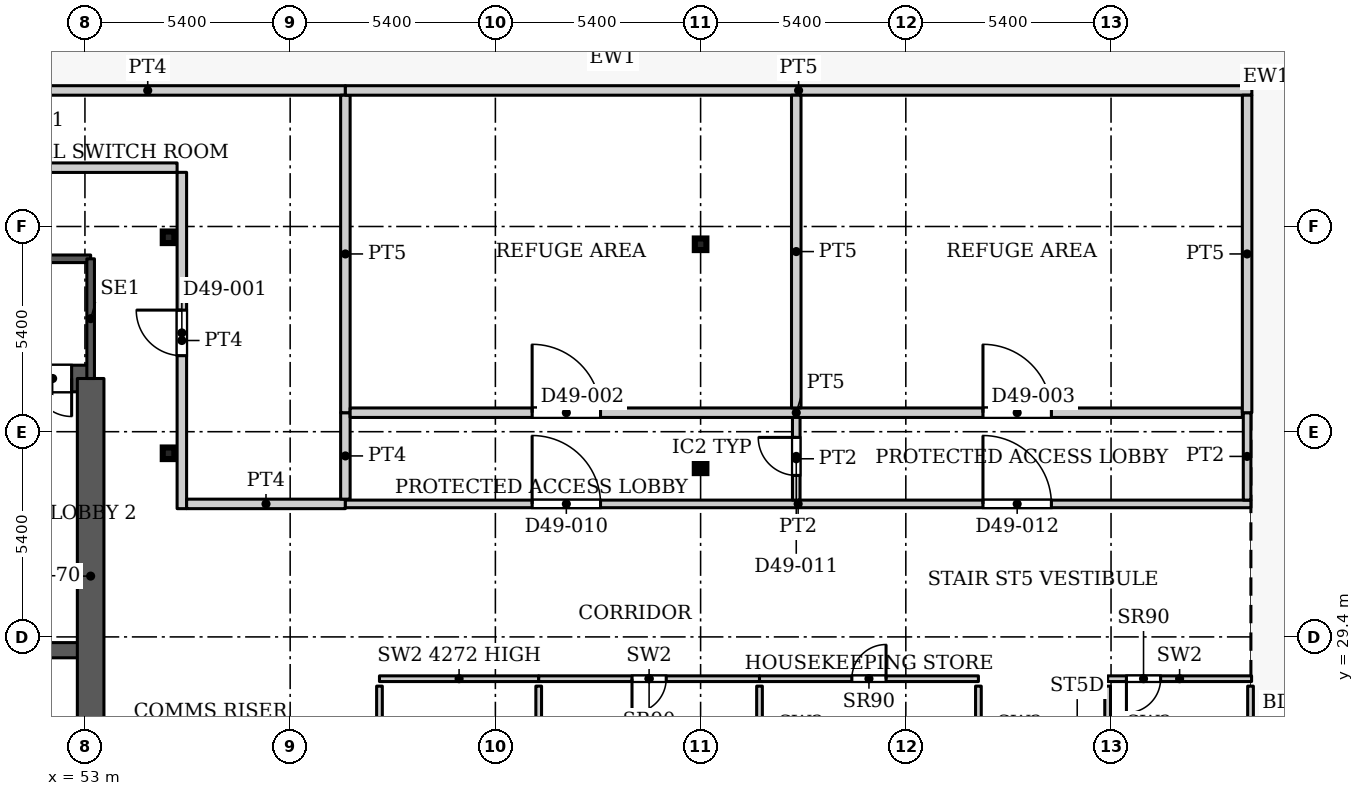
"""IFC4 building model, lengths in metres.
Left out: names, types, materials, properties, quantities, classifications, styles, units other than length and angle.
Written with IfcOpenShell. Run it as: python <this file> out.ifc"""

import sys

from ifc_helpers import new_model, si_unit, direction, frame, frame_2d, origin, origin_2d, place, context, subcontext, project, spatial, rectangle, hollow_rectangle, extrude, source, transform, mapped, element, fill, save


model = new_model("IFC4")
c1 = context("Model", 3, precision=1e-05, world=origin(), true_north=direction((0.0, 1.0)))
c2 = subcontext(c1, "Body", "Model", "MODEL_VIEW")
j1 = project(units=[si_unit("LENGTHUNIT", "METRE"), si_unit("PLANEANGLEUNIT", "RADIAN")], contexts=[c1])
p1 = place(None, origin())
s1 = spatial("IfcSite", under=j1, at=p1, CompositionType="ELEMENT")
p2 = place(p1, origin())
s2 = spatial("IfcBuilding", under=s1, at=p2, CompositionType="ELEMENT")
p3 = place(p2, frame((0.0, 0.0, 211.1)))
s3 = spatial("IfcBuildingStorey", under=s2, at=p3, CompositionType="ELEMENT", Elevation=211.1)
for number, where, z_axis, x_axis in (
    (1, (69.2, 33.863, 0.0), (0.0, 0.0, 1.0), (1.0, 0.0, 0.0)),
    (2, (55.2, 34.232, 0.0), (0.0, 0.0, 1.0), (1.0, 0.0, 0.0)),
    (3, (69.2, 39.732, 0.0), (0.0, 0.0, 1.0), (1.0, 0.0, 0.0)),
    (4, (55.2, 39.916, 0.0), (0.0, 0.0, 1.0), (1.0, 0.0, 0.0)),
):
    element("IfcColumn", number, at=place(p3, frame(where, z_axis=z_axis, x_axis=x_axis)), inside=s3, PredefinedType="COLUMN", context=c2, shape_type="SweptSolid", body=[
        extrude(hollow_rectangle(XDim=0.305, YDim=0.305, WallThickness=0.016, InnerFilletRadius=0.016, OuterFilletRadius=0.032, at=origin_2d()), origin(), (0.0, 0.0, 1.0), 5.1),
    ])
p4 = place(p3, frame((34.75, 29.05, 0.0), z_axis=(0.0, 0.0, 1.0), x_axis=(1.0, 0.0, 0.0)))
e5 = element("IfcWall", 5, at=p4, inside=s3, PredefinedType="SHEAR", context=c2, shape_type="SweptSolid", body=[
    extrude(rectangle(XDim=18.4, YDim=0.4, at=frame_2d((9.2, 0.0))), origin(), (0.0, 0.0, 1.0), 5.1),
])
p5 = place(p4, frame((0.875, 0.0, 0.0)))
e6 = element("IfcOpeningElement", 6, at=p5, cuts=e5, PredefinedType="OPENING", context=c2, shape_type="SweptSolid", body=[
    extrude(rectangle(XDim=1.1, YDim=2.2, at=frame_2d((0.55, 1.1))), frame((0.0, 0.21, 0.0), z_axis=(0.0, -1.0, 0.0), x_axis=(1.0, 0.0, 0.0)), (0.0, 0.0, 1.0), 0.42),
])
p6 = place(p4, frame((3.725, 0.0, 0.0)))
e7 = element("IfcOpeningElement", 7, at=p6, cuts=e5, PredefinedType="OPENING", context=c2, shape_type="SweptSolid", body=[
    extrude(rectangle(XDim=1.1, YDim=2.2, at=frame_2d((0.55, 1.1))), frame((0.0, 0.21, 0.0), z_axis=(0.0, -1.0, 0.0), x_axis=(1.0, 0.0, 0.0)), (0.0, 0.0, 1.0), 0.42),
])
p7 = place(p4, frame((6.575, 0.0, 0.0)))
e8 = element("IfcOpeningElement", 8, at=p7, cuts=e5, PredefinedType="OPENING", context=c2, shape_type="SweptSolid", body=[
    extrude(rectangle(XDim=1.1, YDim=2.2, at=frame_2d((0.55, 1.1))), frame((0.0, 0.21, 0.0), z_axis=(0.0, -1.0, 0.0), x_axis=(1.0, 0.0, 0.0)), (0.0, 0.0, 1.0), 0.42),
])
p8 = place(p4, frame((9.425, 0.0, 0.0)))
e9 = element("IfcOpeningElement", 9, at=p8, cuts=e5, PredefinedType="OPENING", context=c2, shape_type="SweptSolid", body=[
    extrude(rectangle(XDim=1.1, YDim=2.2, at=frame_2d((0.55, 1.1))), frame((0.0, 0.21, 0.0), z_axis=(0.0, -1.0, 0.0), x_axis=(1.0, 0.0, 0.0)), (0.0, 0.0, 1.0), 0.42),
])
p9 = place(p4, frame((12.275, 0.0, 0.0)))
e10 = element("IfcOpeningElement", 10, at=p9, cuts=e5, PredefinedType="OPENING", context=c2, shape_type="SweptSolid", body=[
    extrude(rectangle(XDim=1.1, YDim=2.2, at=frame_2d((0.55, 1.1))), frame((0.0, 0.21, 0.0), z_axis=(0.0, -1.0, 0.0), x_axis=(1.0, 0.0, 0.0)), (0.0, 0.0, 1.0), 0.42),
])
p10 = place(p4, frame((15.125, 0.0, 0.0)))
e11 = element("IfcOpeningElement", 11, at=p10, cuts=e5, PredefinedType="OPENING", context=c2, shape_type="SweptSolid", body=[
    extrude(rectangle(XDim=1.1, YDim=2.2, at=frame_2d((0.55, 1.1))), frame((0.0, 0.21, 0.0), z_axis=(0.0, -1.0, 0.0), x_axis=(1.0, 0.0, 0.0)), (0.0, 0.0, 1.0), 0.42),
])
p11 = place(p3, frame((34.75, 36.2, 0.0), z_axis=(0.0, 0.0, 1.0), x_axis=(1.0, 0.0, 0.0)))
e12 = element("IfcWall", 12, at=p11, inside=s3, PredefinedType="SHEAR", context=c2, shape_type="SweptSolid", body=[
    extrude(rectangle(XDim=18.4, YDim=0.7, at=frame_2d((9.2, 0.0))), origin(), (0.0, 0.0, 1.0), 5.1),
])
p12 = place(p11, frame((16.9, 0.0, 0.0)))
e13 = element("IfcOpeningElement", 13, at=p12, cuts=e12, PredefinedType="OPENING", context=c2, shape_type="SweptSolid", body=[
    extrude(rectangle(XDim=1.0, YDim=2.2, at=frame_2d((0.5, 1.1))), frame((0.0, 0.36, 0.0), z_axis=(0.0, -1.0, 0.0), x_axis=(1.0, 0.0, 0.0)), (0.0, 0.0, 1.0), 0.72),
])
p13 = place(p3, frame((53.15, 25.8, 0.0), z_axis=(0.0, 0.0, 1.0), x_axis=(0.0, 1.0, 0.0)))
e14 = element("IfcWall", 14, at=p13, inside=s3, PredefinedType="SHEAR", context=c2, shape_type="SweptSolid", body=[
    extrude(rectangle(XDim=10.4, YDim=0.7, at=frame_2d((5.2, 0.0))), origin(), (0.0, 0.0, 1.0), 5.1),
])
p14 = place(p3, frame((43.99, 39.35, 0.0), z_axis=(0.0, 0.0, 1.0), x_axis=(1.0, 0.0, 0.0)))
e15 = element("IfcWall", 15, at=p14, inside=s3, PredefinedType="SHEAR", context=c2, shape_type="SweptSolid", body=[
    extrude(rectangle(XDim=9.16, YDim=0.2, at=frame_2d((4.58, 0.0))), origin(), (0.0, 0.0, 1.0), 5.1),
])
p15 = place(p3, frame((53.15, 36.2, 0.0), z_axis=(0.0, 0.0, 1.0), x_axis=(0.0, 1.0, 0.0)))
e16 = element("IfcWall", 16, at=p15, inside=s3, PredefinedType="SHEAR", context=c2, shape_type="SweptSolid", body=[
    extrude(rectangle(XDim=3.15, YDim=0.2, at=frame_2d((1.575, 0.0))), origin(), (0.0, 0.0, 1.0), 5.1),
])
p16 = place(p3, frame((60.75, 28.3, 0.0), z_axis=(0.0, 0.0, 1.0), x_axis=(1.0, 0.0, 0.0)))
e17 = element("IfcWall", 17, at=p16, inside=s3, PredefinedType="PARTITIONING", context=c2, shape_type="SweptSolid", body=[
    extrude(rectangle(XDim=4.19, YDim=0.15, at=frame_2d((2.095, 0.0))), origin(), (0.0, 0.0, 1.0), 4.272),
])
p17 = place(p3, frame((60.75, 23.075, 0.0), z_axis=(0.0, 0.0, 1.0), x_axis=(0.0, 1.0, 0.0)))
e18 = element("IfcWall", 18, at=p17, inside=s3, PredefinedType="PARTITIONING", context=c2, shape_type="SweptSolid", body=[
    extrude(rectangle(XDim=5.03, YDim=0.15, at=frame_2d((2.515, 0.0))), origin(), (0.0, 0.0, 1.0), 5.1),
])
p18 = place(p17, frame((2.387, 0.0, 0.0)))
e19 = element("IfcOpeningElement", 19, at=p18, cuts=e18, PredefinedType="OPENING", context=c2, shape_type="SweptSolid", body=[
    extrude(rectangle(XDim=0.9, YDim=2.2, at=frame_2d((0.45, 1.1))), frame((0.0, 0.085, 0.0), z_axis=(0.0, -1.0, 0.0), x_axis=(1.0, 0.0, 0.0)), (0.0, 0.0, 1.0), 0.17),
])
p19 = place(p3, frame((64.94, 22.854, 0.0), z_axis=(0.0, 0.0, 1.0), x_axis=(0.0, 1.0, 0.0)))
e20 = element("IfcWall", 20, at=p19, inside=s3, PredefinedType="PARTITIONING", context=c2, shape_type="SweptSolid", body=[
    extrude(rectangle(XDim=5.251, YDim=0.15, at=frame_2d((2.625, 0.0))), origin(), (0.0, 0.0, 1.0), 5.1),
])
p20 = place(p3, frame((64.94, 28.3, 0.0), z_axis=(0.0, 0.0, 1.0), x_axis=(1.0, 0.0, 0.0)))
e21 = element("IfcWall", 21, at=p20, inside=s3, PredefinedType="PARTITIONING", context=c2, shape_type="SweptSolid", body=[
    extrude(rectangle(XDim=5.81, YDim=0.15, at=frame_2d((2.905, 0.0))), origin(), (0.0, 0.0, 1.0), 5.1),
])
p21 = place(p20, frame((2.455, 0.0, 0.0)))
e22 = element("IfcOpeningElement", 22, at=p21, cuts=e21, PredefinedType="OPENING", context=c2, shape_type="SweptSolid", body=[
    extrude(rectangle(XDim=0.9, YDim=2.2, at=frame_2d((0.45, 1.1))), frame((0.0, 0.085, 0.0), z_axis=(0.0, -1.0, 0.0), x_axis=(1.0, 0.0, 0.0)), (0.0, 0.0, 1.0), 0.17),
])
p22 = place(p3, frame((70.75, 26.12, 0.0), z_axis=(0.0, 0.0, 1.0), x_axis=(0.0, 1.0, 0.0)))
e23 = element("IfcWall", 23, at=p22, inside=s3, PredefinedType="PARTITIONING", context=c2, shape_type="SweptSolid", body=[
    extrude(rectangle(XDim=1.985, YDim=0.15, at=frame_2d((0.992, 0.0))), origin(), (0.0, 0.0, 1.0), 5.1),
])
p23 = place(p3, frame((70.75, 28.3, 0.0), z_axis=(0.0, 0.0, 1.0), x_axis=(1.0, 0.0, 0.0)))
e24 = element("IfcWall", 24, at=p23, inside=s3, PredefinedType="PARTITIONING", context=c2, shape_type="SweptSolid", body=[
    extrude(rectangle(XDim=5.76, YDim=0.15, at=frame_2d((2.88, 0.0))), origin(), (0.0, 0.0, 1.0), 5.1),
])
p24 = place(p23, frame((2.43, 0.0, 0.0)))
e25 = element("IfcOpeningElement", 25, at=p24, cuts=e24, PredefinedType="OPENING", context=c2, shape_type="SweptSolid", body=[
    extrude(rectangle(XDim=0.9, YDim=2.2, at=frame_2d((0.45, 1.1))), frame((0.0, 0.085, 0.0), z_axis=(0.0, -1.0, 0.0), x_axis=(1.0, 0.0, 0.0)), (0.0, 0.0, 1.0), 0.17),
])
p25 = place(p3, frame((76.51, 26.12, 0.0), z_axis=(0.0, 0.0, 1.0), x_axis=(0.0, 1.0, 0.0)))
e26 = element("IfcWall", 26, at=p25, inside=s3, PredefinedType="PARTITIONING", context=c2, shape_type="SweptSolid", body=[
    extrude(rectangle(XDim=1.985, YDim=0.15, at=frame_2d((0.992, 0.0))), origin(), (0.0, 0.0, 1.0), 5.1),
])
p26 = place(p3, frame((79.91, 28.3, 0.0), z_axis=(0.0, 0.0, 1.0), x_axis=(1.0, 0.0, 0.0)))
e27 = element("IfcWall", 27, at=p26, inside=s3, PredefinedType="PARTITIONING", context=c2, shape_type="SweptSolid", body=[
    extrude(rectangle(XDim=3.788, YDim=0.15, at=frame_2d((1.894, 0.0))), origin(), (0.0, 0.0, 1.0), 5.1),
])
p27 = place(p26, frame((0.495, 0.0, 0.0)))
e28 = element("IfcOpeningElement", 28, at=p27, cuts=e27, PredefinedType="OPENING", context=c2, shape_type="SweptSolid", body=[
    extrude(rectangle(XDim=0.9, YDim=2.2, at=frame_2d((0.45, 1.1))), frame((0.0, 0.085, 0.0), z_axis=(0.0, -1.0, 0.0), x_axis=(1.0, 0.0, 0.0)), (0.0, 0.0, 1.0), 0.17),
])
p28 = place(p3, frame((79.91, 26.12, 0.0), z_axis=(0.0, 0.0, 1.0), x_axis=(0.0, 1.0, 0.0)))
e29 = element("IfcWall", 29, at=p28, inside=s3, PredefinedType="PARTITIONING", context=c2, shape_type="SweptSolid", body=[
    extrude(rectangle(XDim=1.985, YDim=0.15, at=frame_2d((0.992, 0.0))), origin(), (0.0, 0.0, 1.0), 5.1),
])
p29 = place(p3, frame((83.67, 21.868, 0.0), z_axis=(0.0, 0.0, 1.0), x_axis=(0.0, 1.0, 0.0)))
e30 = element("IfcWall", 30, at=p29, inside=s3, PredefinedType="PARTITIONING", context=c2, shape_type="SweptSolid", body=[
    extrude(rectangle(XDim=6.237, YDim=0.15, at=frame_2d((3.119, 0.0))), origin(), (0.0, 0.0, 1.0), 5.1),
])
p30 = place(p3, frame((41.715, 41.746, 0.0), z_axis=(0.0, 0.0, 1.0), x_axis=(0.999999989853, 0.000142460288, 0.0)))
e31 = element("IfcWall", 31, at=p30, inside=s3, PredefinedType="PARTITIONING", context=c2, shape_type="SweptSolid", body=[
    extrude(rectangle(XDim=13.71, YDim=0.25, at=frame_2d((6.855, 0.0))), origin(), (0.0, 0.0, 1.0), 4.8),
])
p31 = place(p3, frame((49.451, 43.78, 0.0), z_axis=(0.0, 0.0, 1.0), x_axis=(1.0, 0.0, 0.0)))
e32 = element("IfcWall", 32, at=p31, inside=s3, PredefinedType="PARTITIONING", context=c2, shape_type="SweptSolid", body=[
    extrude(rectangle(XDim=10.402, YDim=0.25, at=frame_2d((5.201, 0.0))), origin(), (0.0, 0.0, 1.0), 4.8),
])
p32 = place(p3, frame((55.55, 32.775, 0.0), z_axis=(0.0, 0.0, 1.0), x_axis=(0.0, 1.0, 0.0)))
e33 = element("IfcWall", 33, at=p32, inside=s3, PredefinedType="PARTITIONING", context=c2, shape_type="SweptSolid", body=[
    extrude(rectangle(XDim=8.85, YDim=0.25, at=frame_2d((4.425, 0.0))), origin(), (0.0, 0.0, 1.0), 4.8),
])
p33 = place(p32, frame((4.025, 0.0, 0.0)))
e34 = element("IfcOpeningElement", 34, at=p33, cuts=e33, PredefinedType="OPENING", context=c2, shape_type="SweptSolid", body=[
    extrude(rectangle(XDim=1.2, YDim=2.1, at=frame_2d((0.6, 1.05))), frame((0.0, 0.135, 0.0), z_axis=(0.0, -1.0, 0.0), x_axis=(1.0, 0.0, 0.0)), (0.0, 0.0, 1.0), 0.27),
])
p34 = place(p3, frame((55.675, 32.9, 0.0), z_axis=(0.0, 0.0, 1.0), x_axis=(1.0, 0.0, 0.0)))
e35 = element("IfcWall", 35, at=p34, inside=s3, PredefinedType="PARTITIONING", context=c2, shape_type="SweptSolid", body=[
    extrude(rectangle(XDim=4.178, YDim=0.25, at=frame_2d((2.089, 0.0))), origin(), (0.0, 0.0, 1.0), 4.8),
])
p35 = place(p3, frame((59.853, 32.9, 0.0), z_axis=(0.0, 0.0, 1.0), x_axis=(1.0, 0.0, 0.0)))
e36 = element("IfcWall", 36, at=p35, inside=s3, PredefinedType="PARTITIONING", context=c2, shape_type="SweptSolid", body=[
    extrude(rectangle(XDim=23.827, YDim=0.2, at=frame_2d((11.914, 0.0))), origin(), (0.0, 0.0, 1.0), 4.8),
])
p36 = place(p35, frame((4.914, 0.0, 0.0)))
e37 = element("IfcOpeningElement", 37, at=p36, cuts=e36, PredefinedType="OPENING", context=c2, shape_type="SweptSolid", body=[
    extrude(rectangle(XDim=1.8, YDim=2.1, at=frame_2d((0.9, 1.05))), frame((0.0, 0.11, 0.0), z_axis=(0.0, -1.0, 0.0), x_axis=(1.0, 0.0, 0.0)), (0.0, 0.0, 1.0), 0.22),
])
p37 = place(p35, frame((16.777, 0.0, 0.0)))
e38 = element("IfcOpeningElement", 38, at=p37, cuts=e36, PredefinedType="OPENING", context=c2, shape_type="SweptSolid", body=[
    extrude(rectangle(XDim=1.8, YDim=2.1, at=frame_2d((0.9, 1.05))), frame((0.0, 0.11, 0.0), z_axis=(0.0, -1.0, 0.0), x_axis=(1.0, 0.0, 0.0)), (0.0, 0.0, 1.0), 0.22),
])
p38 = place(p3, frame((59.853, 33.025, 0.0), z_axis=(0.0, 0.0, 1.0), x_axis=(0.0, 1.0, 0.0)))
e39 = element("IfcWall", 39, at=p38, inside=s3, PredefinedType="PARTITIONING", context=c2, shape_type="SweptSolid", body=[
    extrude(rectangle(XDim=2.275, YDim=0.25, at=frame_2d((1.138, 0.0))), origin(), (0.0, 0.0, 1.0), 4.8),
])
p39 = place(p3, frame((59.853, 35.3, 0.0), z_axis=(0.0, 0.0, 1.0), x_axis=(0.0, 1.0, 0.0)))
e40 = element("IfcWall", 40, at=p39, inside=s3, PredefinedType="PARTITIONING", context=c2, shape_type="SweptSolid", body=[
    extrude(rectangle(XDim=8.355, YDim=0.25, at=frame_2d((4.177, 0.0))), origin(), (0.0, 0.0, 1.0), 4.8),
])
p40 = place(p3, frame((59.853, 43.78, 0.0), z_axis=(0.0, 0.0, 1.0), x_axis=(1.0, 0.0, 0.0)))
e41 = element("IfcWall", 41, at=p40, inside=s3, PredefinedType="PARTITIONING", context=c2, shape_type="SweptSolid", body=[
    extrude(rectangle(XDim=23.852, YDim=0.25, at=frame_2d((11.926, 0.0))), origin(), (0.0, 0.0, 1.0), 4.8),
])
p41 = place(p3, frame((59.978, 35.3, 0.0), z_axis=(0.0, 0.0, 1.0), x_axis=(1.0, 0.0, 0.0)))
e42 = element("IfcWall", 42, at=p41, inside=s3, PredefinedType="PARTITIONING", context=c2, shape_type="SweptSolid", body=[
    extrude(rectangle(XDim=23.477, YDim=0.25, at=frame_2d((11.739, 0.0))), origin(), (0.0, 0.0, 1.0), 4.8),
])
p42 = place(p41, frame((4.789, 0.0, 0.0)))
e43 = element("IfcOpeningElement", 43, at=p42, cuts=e42, PredefinedType="OPENING", context=c2, shape_type="SweptSolid", body=[
    extrude(rectangle(XDim=1.8, YDim=2.1, at=frame_2d((0.9, 1.05))), frame((0.0, 0.135, 0.0), z_axis=(0.0, -1.0, 0.0), x_axis=(1.0, 0.0, 0.0)), (0.0, 0.0, 1.0), 0.27),
])
p43 = place(p41, frame((16.652, 0.0, 0.0)))
e44 = element("IfcOpeningElement", 44, at=p43, cuts=e42, PredefinedType="OPENING", context=c2, shape_type="SweptSolid", body=[
    extrude(rectangle(XDim=1.8, YDim=2.1, at=frame_2d((0.9, 1.05))), frame((0.0, 0.135, 0.0), z_axis=(0.0, -1.0, 0.0), x_axis=(1.0, 0.0, 0.0)), (0.0, 0.0, 1.0), 0.27),
])
p44 = place(p3, frame((71.717, 33.0, 0.0), z_axis=(0.0, 0.0, 1.0), x_axis=(0.0, 1.0, 0.0)))
e45 = element("IfcWall", 45, at=p44, inside=s3, PredefinedType="PARTITIONING", context=c2, shape_type="SweptSolid", body=[
    extrude(rectangle(XDim=2.175, YDim=0.2, at=frame_2d((1.087, 0.0))), origin(), (0.0, 0.0, 1.0), 4.8),
])
p45 = place(p44, frame((0.65, 0.0, 0.0)))
e46 = element("IfcOpeningElement", 46, at=p45, cuts=e45, PredefinedType="OPENING", context=c2, shape_type="SweptSolid", body=[
    extrude(rectangle(XDim=1.0, YDim=2.1, at=frame_2d((0.5, 1.05))), frame((0.0, 0.11, 0.0), z_axis=(0.0, -1.0, 0.0), x_axis=(1.0, 0.0, 0.0)), (0.0, 0.0, 1.0), 0.22),
])
p46 = place(p3, frame((71.717, 35.425, 0.0), z_axis=(0.0, 0.0, 1.0), x_axis=(0.0, 1.0, 0.0)))
e47 = element("IfcWall", 47, at=p46, inside=s3, PredefinedType="PARTITIONING", context=c2, shape_type="SweptSolid", body=[
    extrude(rectangle(XDim=8.23, YDim=0.25, at=frame_2d((4.115, 0.0))), origin(), (0.0, 0.0, 1.0), 4.8),
])
p47 = place(p3, frame((83.58, 33.0, 0.0), z_axis=(0.0, 0.0, 1.0), x_axis=(0.0, 1.0, 0.0)))
e48 = element("IfcWall", 48, at=p47, inside=s3, PredefinedType="PARTITIONING", context=c2, shape_type="SweptSolid", body=[
    extrude(rectangle(XDim=2.3, YDim=0.2, at=frame_2d((1.15, 0.0))), origin(), (0.0, 0.0, 1.0), 4.8),
])
p48 = place(p3, frame((83.58, 35.3, 0.0), z_axis=(0.0, 0.0, 1.0), x_axis=(0.0, 1.0, 0.0)))
e49 = element("IfcWall", 49, at=p48, inside=s3, PredefinedType="PARTITIONING", context=c2, shape_type="SweptSolid", body=[
    extrude(rectangle(XDim=8.355, YDim=0.25, at=frame_2d((4.177, 0.0))), origin(), (0.0, 0.0, 1.0), 4.8),
])
m1 = source(origin(), c2, "Body", "SweptSolid", [
    extrude(rectangle(XDim=0.9, YDim=2.2, at=frame_2d((0.45, 1.1))), frame((0.0, 0.025, 0.0), z_axis=(0.0, -1.0, 0.0), x_axis=(1.0, 0.0, 0.0)), (0.0, 0.0, 1.0), 0.05),
])
p49 = place(p21, origin())
e50 = element("IfcDoor", 50, at=p49, inside=s3, OperationType="SINGLE_SWING_RIGHT", PredefinedType="DOOR", context=c2, shape_type="MappedRepresentation", body=[
    mapped(m1, transform((0.0, 0.0, 0.0), x_axis=(1.0, 0.0, 0.0), y_axis=(0.0, 1.0, 0.0), z_axis=(0.0, 0.0, 1.0), scale=1.0)),
])
fill(e22, e50)
p50 = place(p24, origin())
e51 = element("IfcDoor", 51, at=p50, inside=s3, OperationType="SINGLE_SWING_LEFT", PredefinedType="DOOR", context=c2, shape_type="MappedRepresentation", body=[
    mapped(m1, transform((0.0, 0.0, 0.0), x_axis=(1.0, 0.0, 0.0), y_axis=(0.0, 1.0, 0.0), z_axis=(0.0, 0.0, 1.0), scale=1.0)),
])
fill(e25, e51)
p51 = place(p27, origin())
e52 = element("IfcDoor", 52, at=p51, inside=s3, OperationType="SINGLE_SWING_RIGHT", PredefinedType="DOOR", context=c2, shape_type="MappedRepresentation", body=[
    mapped(m1, transform((0.0, 0.0, 0.0), x_axis=(1.0, 0.0, 0.0), y_axis=(0.0, 1.0, 0.0), z_axis=(0.0, 0.0, 1.0), scale=1.0)),
])
fill(e28, e52)
m2 = source(origin(), c2, "Body", "SweptSolid", [
    extrude(rectangle(XDim=1.0, YDim=2.2, at=frame_2d((0.5, 1.1))), frame((0.0, 0.025, 0.0), z_axis=(0.0, -1.0, 0.0), x_axis=(1.0, 0.0, 0.0)), (0.0, 0.0, 1.0), 0.05),
])
p52 = place(p12, origin())
e53 = element("IfcDoor", 53, at=p52, inside=s3, OperationType="SINGLE_SWING_RIGHT", PredefinedType="DOOR", context=c2, shape_type="MappedRepresentation", body=[
    mapped(m2, transform((0.0, 0.0, 0.0), x_axis=(1.0, 0.0, 0.0), y_axis=(0.0, 1.0, 0.0), z_axis=(0.0, 0.0, 1.0), scale=1.0)),
])
fill(e13, e53)
m3 = source(origin(), c2, "Body", "SweptSolid", [
    extrude(rectangle(XDim=1.2, YDim=2.1, at=frame_2d((0.6, 1.05))), frame((0.0, 0.025, 0.0), z_axis=(0.0, -1.0, 0.0), x_axis=(1.0, 0.0, 0.0)), (0.0, 0.0, 1.0), 0.05),
])
p53 = place(p33, origin())
e54 = element("IfcDoor", 54, at=p53, inside=s3, OperationType="SINGLE_SWING_LEFT", PredefinedType="DOOR", context=c2, shape_type="MappedRepresentation", body=[
    mapped(m3, transform((0.0, 0.0, 0.0), x_axis=(1.0, 0.0, 0.0), y_axis=(0.0, 1.0, 0.0), z_axis=(0.0, 0.0, 1.0), scale=1.0)),
])
fill(e34, e54)
m4 = source(origin(), c2, "Body", "SweptSolid", [
    extrude(rectangle(XDim=1.8, YDim=2.1, at=frame_2d((0.9, 1.05))), frame((0.0, 0.025, 0.0), z_axis=(0.0, -1.0, 0.0), x_axis=(1.0, 0.0, 0.0)), (0.0, 0.0, 1.0), 0.05),
])
p54 = place(p42, origin())
e55 = element("IfcDoor", 55, at=p54, inside=s3, OperationType="DOUBLE_DOOR_SINGLE_SWING", PredefinedType="DOOR", context=c2, shape_type="MappedRepresentation", body=[
    mapped(m4, transform((0.0, 0.0, 0.0), x_axis=(1.0, 0.0, 0.0), y_axis=(0.0, 1.0, 0.0), z_axis=(0.0, 0.0, 1.0), scale=1.0)),
])
fill(e43, e55)
p55 = place(p43, origin())
e56 = element("IfcDoor", 56, at=p55, inside=s3, OperationType="DOUBLE_DOOR_SINGLE_SWING", PredefinedType="DOOR", context=c2, shape_type="MappedRepresentation", body=[
    mapped(m4, transform((0.0, 0.0, 0.0), x_axis=(1.0, 0.0, 0.0), y_axis=(0.0, 1.0, 0.0), z_axis=(0.0, 0.0, 1.0), scale=1.0)),
])
fill(e44, e56)
m5 = source(origin(), c2, "Body", "SweptSolid", [
    extrude(rectangle(XDim=1.8, YDim=2.1, at=frame_2d((0.9, 1.05))), frame((0.0, 0.025, 0.0), z_axis=(0.0, -1.0, 0.0), x_axis=(1.0, 0.0, 0.0)), (0.0, 0.0, 1.0), 0.05),
])
p56 = place(p36, origin())
e57 = element("IfcDoor", 57, at=p56, inside=s3, OperationType="DOUBLE_DOOR_SINGLE_SWING", PredefinedType="DOOR", context=c2, shape_type="MappedRepresentation", body=[
    mapped(m5, transform((0.0, 0.0, 0.0), x_axis=(1.0, 0.0, 0.0), y_axis=(0.0, 1.0, 0.0), z_axis=(0.0, 0.0, 1.0), scale=1.0)),
])
fill(e37, e57)
m6 = source(origin(), c2, "Body", "SweptSolid", [
    extrude(rectangle(XDim=1.0, YDim=2.1, at=frame_2d((0.5, 1.05))), frame((0.0, 0.025, 0.0), z_axis=(0.0, -1.0, 0.0), x_axis=(1.0, 0.0, 0.0)), (0.0, 0.0, 1.0), 0.05),
])
p57 = place(p45, origin())
e58 = element("IfcDoor", 58, at=p57, inside=s3, OperationType="SINGLE_SWING_LEFT", PredefinedType="DOOR", context=c2, shape_type="MappedRepresentation", body=[
    mapped(m6, transform((0.0, 0.0, 0.0), x_axis=(1.0, 0.0, 0.0), y_axis=(0.0, 1.0, 0.0), z_axis=(0.0, 0.0, 1.0), scale=1.0)),
])
fill(e46, e58)
p58 = place(p37, origin())
e59 = element("IfcDoor", 59, at=p58, inside=s3, OperationType="DOUBLE_DOOR_SINGLE_SWING", PredefinedType="DOOR", context=c2, shape_type="MappedRepresentation", body=[
    mapped(m5, transform((0.0, 0.0, 0.0), x_axis=(1.0, 0.0, 0.0), y_axis=(0.0, 1.0, 0.0), z_axis=(0.0, 0.0, 1.0), scale=1.0)),
])
fill(e38, e59)
save(model, sys.argv[1])
